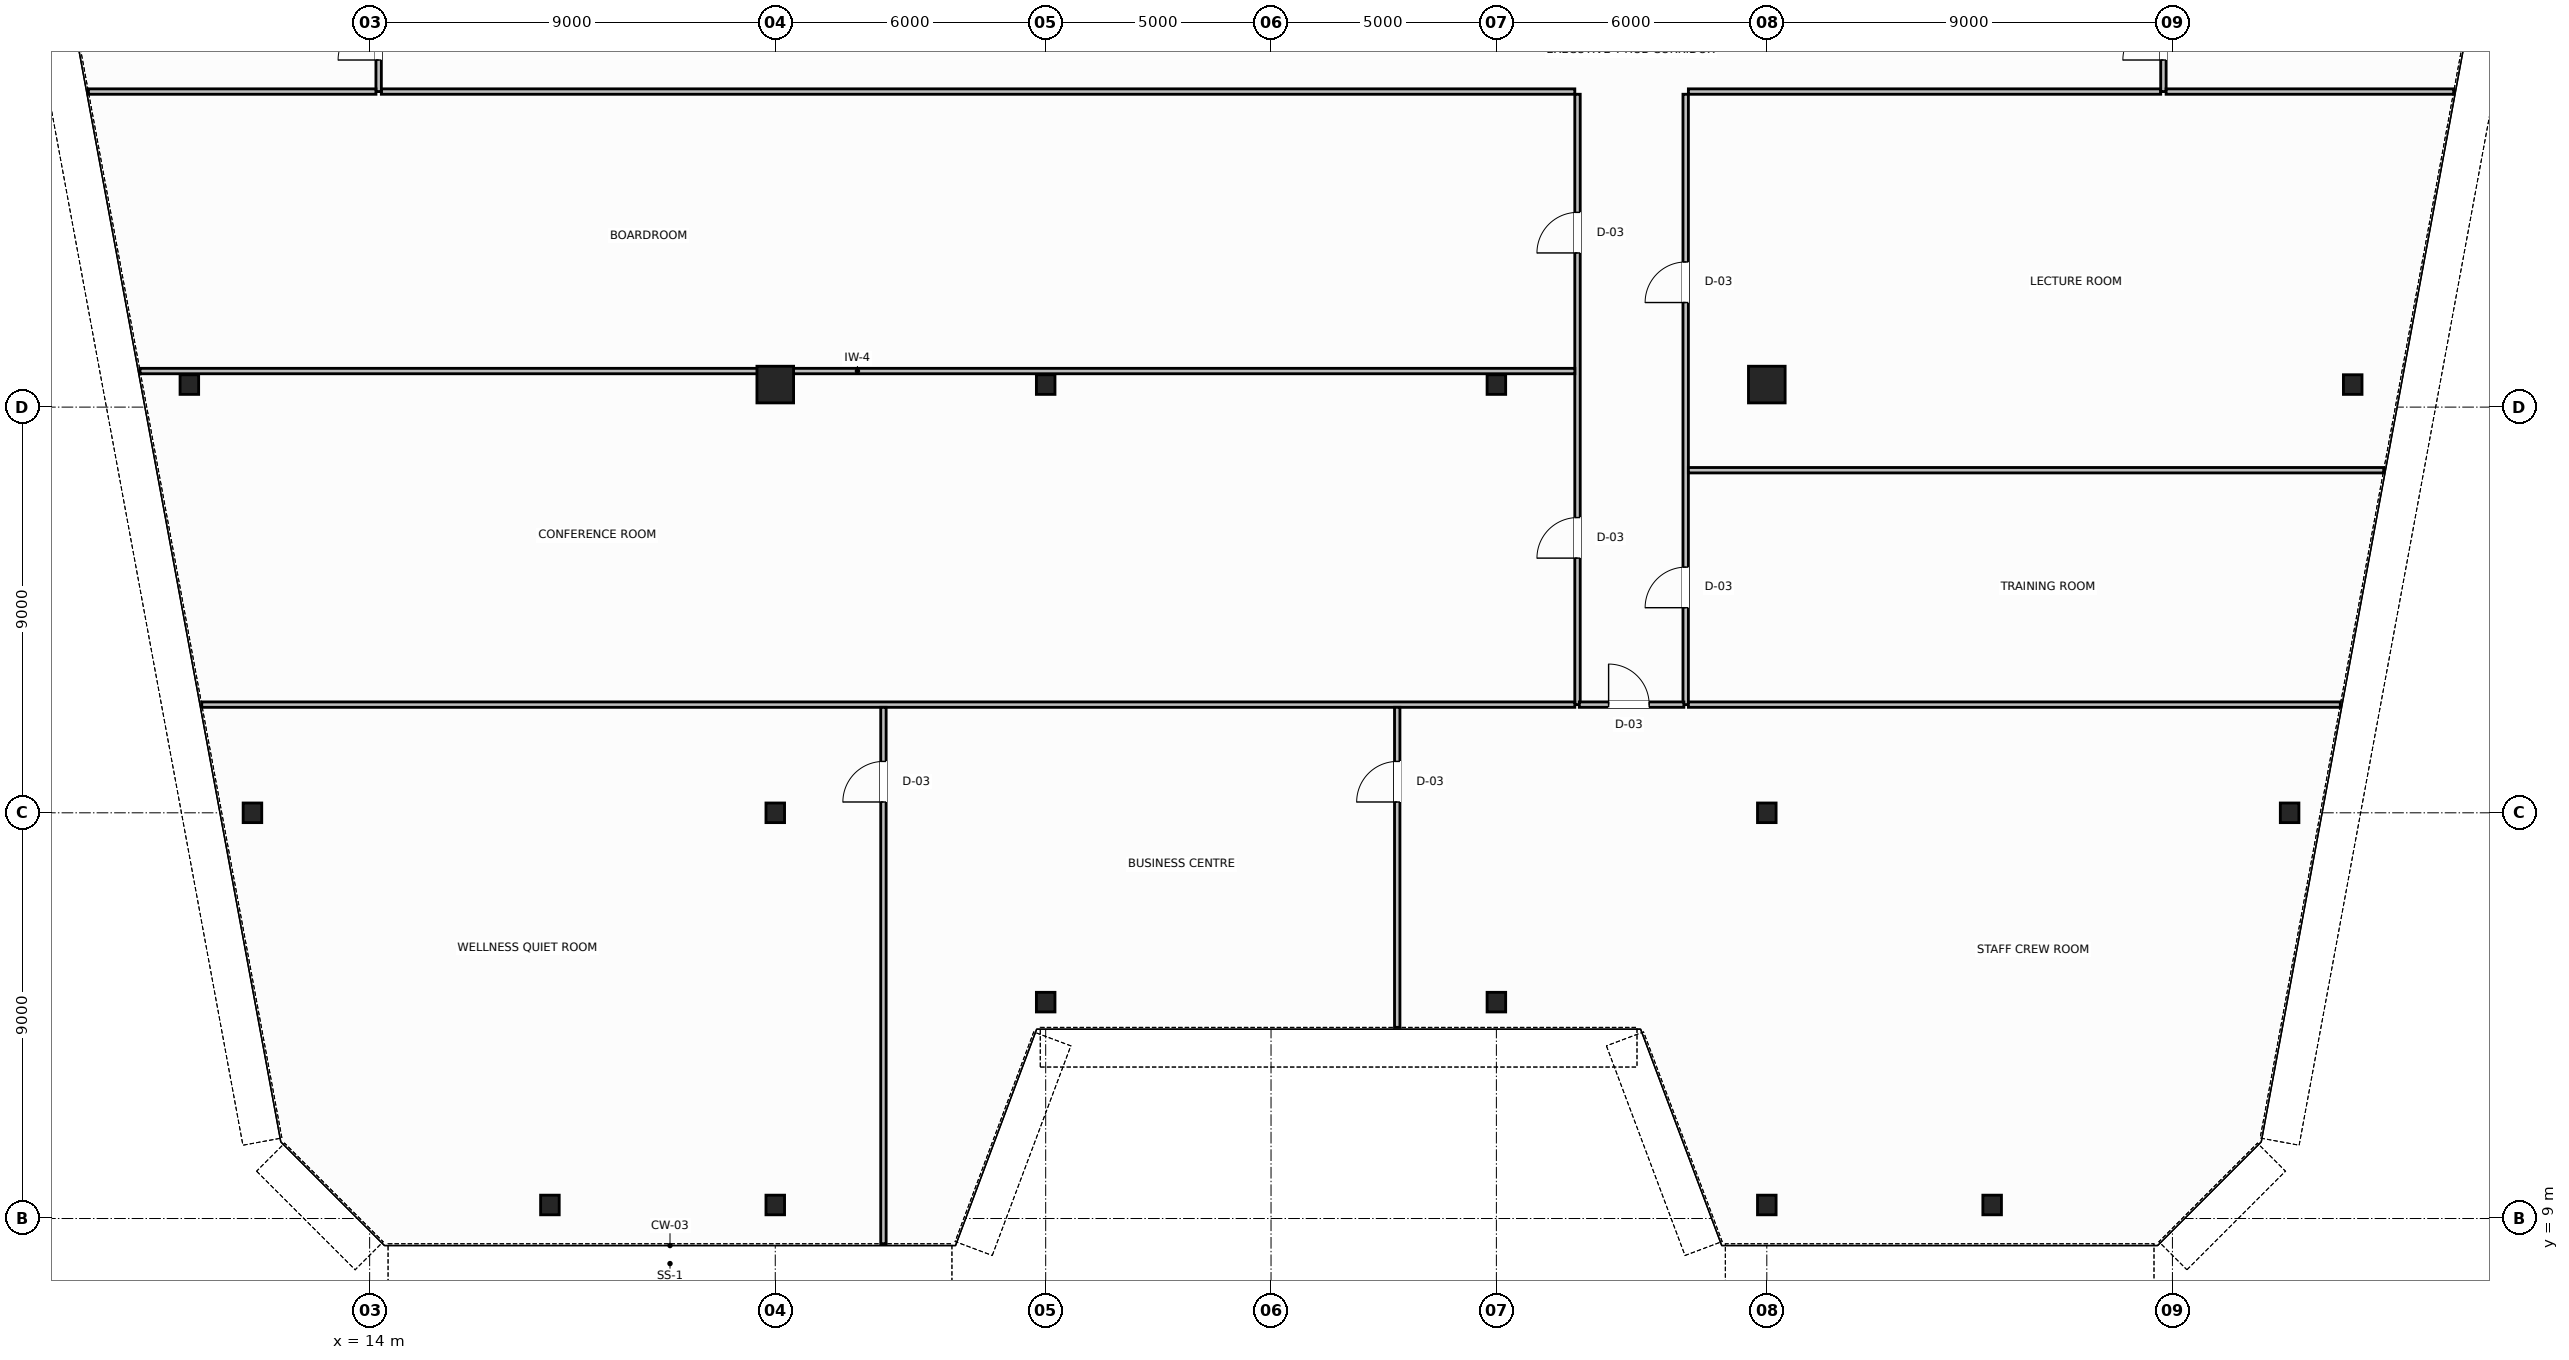
"""IFC4 building model, lengths in metres.
Left out: names, types, materials, properties, quantities, classifications, styles, units other than length and angle.
Written with IfcOpenShell. Run it as: python <this file> out.ifc"""

import sys

from ifc_helpers import new_model, si_unit, direction, frame, frame_2d, origin, origin_2d, place, context, subcontext, project, spatial, rectangle, hollow_circle, i_section, extrude, source, transform, mapped, element, fill, save


model = new_model("IFC4")
c1 = context("Model", 3, precision=1e-05, world=origin(), true_north=direction((0.0, 1.0)))
c2 = subcontext(c1, "Body", "Model", "MODEL_VIEW")
j1 = project(units=[si_unit("LENGTHUNIT", "METRE"), si_unit("PLANEANGLEUNIT", "RADIAN")], contexts=[c1])
p1 = place(None, origin())
s1 = spatial("IfcSite", under=j1, at=p1, CompositionType="ELEMENT")
p2 = place(p1, origin())
s2 = spatial("IfcBuilding", under=s1, at=p2, CompositionType="ELEMENT")
p3 = place(p2, frame((0.0, 0.0, 214.6)))
s3 = spatial("IfcBuildingStorey", under=s2, at=p3, CompositionType="ELEMENT", Elevation=214.6)
m1 = source(origin(), c2, "Body", "SweptSolid", [
    extrude(i_section(OverallWidth=0.412, OverallDepth=0.435, WebThickness=0.036, FlangeThickness=0.05, FilletRadius=0.015, at=origin_2d()), origin(), (0.0, 0.0, 1.0), 3.8),
])
for number, where, z_axis, x_axis in (
    (1, (10.0, 27.5, 0.0), (0.0, 0.0, 1.0), (1.0, 0.0, 0.0)),
    (2, (11.4, 18.0, 0.0), (0.0, 0.0, 1.0), (1.0, 0.0, 0.0)),
    (3, (58.0, 27.5, 0.0), (0.0, 0.0, 1.0), (1.0, 0.0, 0.0)),
    (4, (56.6, 18.0, 0.0), (0.0, 0.0, 1.0), (1.0, 0.0, 0.0)),
):
    element("IfcColumn", number, at=place(p3, frame(where, z_axis=z_axis, x_axis=x_axis)), inside=s3, PredefinedType="COLUMN", context=c2, shape_type="MappedRepresentation", body=[
        mapped(m1, transform((0.0, 0.0, 0.0), scale=1.0)),
    ])
m2 = source(origin(), c2, "Body", "SweptSolid", [
    extrude(hollow_circle(Radius=0.406, WallThickness=0.04, at=origin_2d()), origin(), (0.0, 0.0, 1.0), 3.8),
])
p4 = place(p3, frame((23.0, 27.5, 0.0), z_axis=(0.0, 0.0, 1.0), x_axis=(1.0, 0.0, 0.0)))
e5 = element("IfcColumn", 5, at=p4, inside=s3, PredefinedType="COLUMN", context=c2, shape_type="MappedRepresentation", body=[
    mapped(m2, transform((0.0, 0.0, 0.0), scale=1.0)),
])
m3 = source(origin(), c2, "Body", "SweptSolid", [
    extrude(i_section(OverallWidth=0.412, OverallDepth=0.435, WebThickness=0.036, FlangeThickness=0.05, FilletRadius=0.015, at=origin_2d()), origin(), (0.0, 0.0, 1.0), 3.8),
])
for number, where, z_axis, x_axis in (
    (6, (29.0, 27.5, 0.0), (0.0, 0.0, 1.0), (1.0, 0.0, 0.0)),
    (7, (39.0, 27.5, 0.0), (0.0, 0.0, 1.0), (1.0, 0.0, 0.0)),
):
    element("IfcColumn", number, at=place(p3, frame(where, z_axis=z_axis, x_axis=x_axis)), inside=s3, PredefinedType="COLUMN", context=c2, shape_type="MappedRepresentation", body=[
        mapped(m3, transform((0.0, 0.0, 0.0), scale=1.0)),
    ])
p5 = place(p3, frame((45.0, 27.5, 0.0), z_axis=(0.0, 0.0, 1.0), x_axis=(1.0, 0.0, 0.0)))
e8 = element("IfcColumn", 8, at=p5, inside=s3, PredefinedType="COLUMN", context=c2, shape_type="MappedRepresentation", body=[
    mapped(m2, transform((0.0, 0.0, 0.0), scale=1.0)),
])
for number, where, z_axis, x_axis in (
    (9, (23.0, 18.0, 0.0), (0.0, 0.0, 1.0), (1.0, 0.0, 0.0)),
    (10, (45.0, 18.0, 0.0), (0.0, 0.0, 1.0), (1.0, 0.0, 0.0)),
    (11, (18.0, 9.3, 0.0), (0.0, 0.0, 1.0), (1.0, 0.0, 0.0)),
    (12, (23.0, 9.3, 0.0), (0.0, 0.0, 1.0), (1.0, 0.0, 0.0)),
    (13, (29.0, 13.8, 0.0), (0.0, 0.0, 1.0), (1.0, 0.0, 0.0)),
    (14, (39.0, 13.8, 0.0), (0.0, 0.0, 1.0), (1.0, 0.0, 0.0)),
    (15, (45.0, 9.3, 0.0), (0.0, 0.0, 1.0), (1.0, 0.0, 0.0)),
    (16, (50.0, 9.3, 0.0), (0.0, 0.0, 1.0), (1.0, 0.0, 0.0)),
):
    element("IfcColumn", number, at=place(p3, frame(where, z_axis=z_axis, x_axis=x_axis)), inside=s3, PredefinedType="COLUMN", context=c2, shape_type="MappedRepresentation", body=[
        mapped(m3, transform((0.0, 0.0, 0.0), scale=1.0)),
    ])
p6 = place(p3, frame((14.26, 34.0, 0.0), z_axis=(0.0, 0.0, 1.0), x_axis=(1.0, 0.0, 0.0)))
e17 = element("IfcWall", 17, at=p6, inside=s3, PredefinedType="PARTITIONING", context=c2, shape_type="SweptSolid", body=[
    extrude(rectangle(XDim=26.48, YDim=0.12, at=frame_2d((13.24, 0.0))), origin(), (0.0, 0.0, 1.0), 3.54),
])
p7 = place(p3, frame((43.26, 34.0, 0.0), z_axis=(0.0, 0.0, 1.0), x_axis=(1.0, 0.0, 0.0)))
e18 = element("IfcWall", 18, at=p7, inside=s3, PredefinedType="PARTITIONING", context=c2, shape_type="SweptSolid", body=[
    extrude(rectangle(XDim=10.48, YDim=0.12, at=frame_2d((5.24, 0.0))), origin(), (0.0, 0.0, 1.0), 3.54),
])
p8 = place(p3, frame((14.2, 34.0, 0.0), z_axis=(0.0, 0.0, 1.0), x_axis=(0.0, 1.0, 0.0)))
e19 = element("IfcWall", 19, at=p8, inside=s3, PredefinedType="PARTITIONING", context=c2, shape_type="SweptSolid", body=[
    extrude(rectangle(XDim=2.44, YDim=0.12, at=frame_2d((1.22, 0.0))), origin(), (0.0, 0.0, 1.0), 3.54),
])
p9 = place(p8, frame((0.7, 0.0, 0.0)))
e20 = element("IfcOpeningElement", 20, at=p9, cuts=e19, PredefinedType="OPENING", context=c2, shape_type="SweptSolid", body=[
    extrude(rectangle(XDim=0.9, YDim=2.15, at=frame_2d((0.45, 1.075))), frame((0.0, 0.07, 0.0), z_axis=(0.0, -1.0, 0.0), x_axis=(1.0, 0.0, 0.0)), (0.0, 0.0, 1.0), 0.14),
])
p10 = place(p3, frame((53.8, 34.0, 0.0), z_axis=(0.0, 0.0, 1.0), x_axis=(0.0, 1.0, 0.0)))
e21 = element("IfcWall", 21, at=p10, inside=s3, PredefinedType="PARTITIONING", context=c2, shape_type="SweptSolid", body=[
    extrude(rectangle(XDim=2.44, YDim=0.12, at=frame_2d((1.22, 0.0))), origin(), (0.0, 0.0, 1.0), 3.54),
])
p11 = place(p10, frame((0.7, 0.0, 0.0)))
e22 = element("IfcOpeningElement", 22, at=p11, cuts=e21, PredefinedType="OPENING", context=c2, shape_type="SweptSolid", body=[
    extrude(rectangle(XDim=0.9, YDim=2.15, at=frame_2d((0.45, 1.075))), frame((0.0, 0.07, 0.0), z_axis=(0.0, -1.0, 0.0), x_axis=(1.0, 0.0, 0.0)), (0.0, 0.0, 1.0), 0.14),
])
p12 = place(p3, frame((40.8, 20.4, 0.0), z_axis=(0.0, 0.0, 1.0), x_axis=(0.0, 1.0, 0.0)))
e23 = element("IfcWall", 23, at=p12, inside=s3, PredefinedType="PARTITIONING", context=c2, shape_type="SweptSolid", body=[
    extrude(rectangle(XDim=13.54, YDim=0.12, at=frame_2d((6.77, 0.0))), origin(), (0.0, 0.0, 1.0), 3.54),
])
p13 = place(p12, frame((3.25, 0.0, 0.0)))
e24 = element("IfcOpeningElement", 24, at=p13, cuts=e23, PredefinedType="OPENING", context=c2, shape_type="SweptSolid", body=[
    extrude(rectangle(XDim=0.9, YDim=2.15, at=frame_2d((0.45, 1.075))), frame((0.0, 0.07, 0.0), z_axis=(0.0, -1.0, 0.0), x_axis=(1.0, 0.0, 0.0)), (0.0, 0.0, 1.0), 0.14),
])
p14 = place(p12, frame((10.02, 0.0, 0.0)))
e25 = element("IfcOpeningElement", 25, at=p14, cuts=e23, PredefinedType="OPENING", context=c2, shape_type="SweptSolid", body=[
    extrude(rectangle(XDim=0.9, YDim=2.15, at=frame_2d((0.45, 1.075))), frame((0.0, 0.07, 0.0), z_axis=(0.0, -1.0, 0.0), x_axis=(1.0, 0.0, 0.0)), (0.0, 0.0, 1.0), 0.14),
])
p15 = place(p3, frame((43.2, 20.4, 0.0), z_axis=(0.0, 0.0, 1.0), x_axis=(0.0, 1.0, 0.0)))
e26 = element("IfcWall", 26, at=p15, inside=s3, PredefinedType="PARTITIONING", context=c2, shape_type="SweptSolid", body=[
    extrude(rectangle(XDim=13.54, YDim=0.12, at=frame_2d((6.77, 0.0))), origin(), (0.0, 0.0, 1.0), 3.54),
])
p16 = place(p15, frame((2.15, 0.0, 0.0)))
e27 = element("IfcOpeningElement", 27, at=p16, cuts=e26, PredefinedType="OPENING", context=c2, shape_type="SweptSolid", body=[
    extrude(rectangle(XDim=0.9, YDim=2.15, at=frame_2d((0.45, 1.075))), frame((0.0, 0.07, 0.0), z_axis=(0.0, -1.0, 0.0), x_axis=(1.0, 0.0, 0.0)), (0.0, 0.0, 1.0), 0.14),
])
p17 = place(p15, frame((8.92, 0.0, 0.0)))
e28 = element("IfcOpeningElement", 28, at=p17, cuts=e26, PredefinedType="OPENING", context=c2, shape_type="SweptSolid", body=[
    extrude(rectangle(XDim=0.9, YDim=2.15, at=frame_2d((0.45, 1.075))), frame((0.0, 0.07, 0.0), z_axis=(0.0, -1.0, 0.0), x_axis=(1.0, 0.0, 0.0)), (0.0, 0.0, 1.0), 0.14),
])
p18 = place(p3, frame((40.84, 20.4, 0.0), z_axis=(0.0, 0.0, 1.0), x_axis=(1.0, 0.0, 0.0)))
e29 = element("IfcWall", 29, at=p18, inside=s3, PredefinedType="PARTITIONING", context=c2, shape_type="SweptSolid", body=[
    extrude(rectangle(XDim=2.32, YDim=0.12, at=frame_2d((1.16, 0.0))), origin(), (0.0, 0.0, 1.0), 3.54),
])
p19 = place(p18, frame((0.65, 0.0, 0.0)))
e30 = element("IfcOpeningElement", 30, at=p19, cuts=e29, PredefinedType="OPENING", context=c2, shape_type="SweptSolid", body=[
    extrude(rectangle(XDim=0.9, YDim=2.15, at=frame_2d((0.45, 1.075))), frame((0.0, 0.07, 0.0), z_axis=(0.0, -1.0, 0.0), x_axis=(1.0, 0.0, 0.0)), (0.0, 0.0, 1.0), 0.14),
])
for number, where, z_axis, x_axis in (
    (31, (7.759, 34.0, 0.0), (0.0, 0.0, 1.0), (1.0, 0.0, 0.0)),
    (32, (53.86, 34.0, 0.0), (0.0, 0.0, 1.0), (1.0, 0.0, 0.0)),
):
    element("IfcWall", number, at=place(p3, frame(where, z_axis=z_axis, x_axis=x_axis)), inside=s3, PredefinedType="PARTITIONING", context=c2, shape_type="SweptSolid", body=[
        extrude(rectangle(XDim=6.381, YDim=0.12, at=frame_2d((3.19, 0.0))), origin(), (0.0, 0.0, 1.0), 3.54),
    ])
p20 = place(p3, frame((8.906, 27.8, 0.0), z_axis=(0.0, 0.0, 1.0), x_axis=(1.0, 0.0, 0.0)))
e33 = element("IfcWall", 33, at=p20, inside=s3, PredefinedType="PARTITIONING", context=c2, shape_type="SweptSolid", body=[
    extrude(rectangle(XDim=31.834, YDim=0.12, at=frame_2d((15.917, 0.0))), origin(), (0.0, 0.0, 1.0), 3.54),
])
p21 = place(p3, frame((43.26, 25.6, 0.0), z_axis=(0.0, 0.0, 1.0), x_axis=(1.0, 0.0, 0.0)))
e34 = element("IfcWall", 34, at=p21, inside=s3, PredefinedType="PARTITIONING", context=c2, shape_type="SweptSolid", body=[
    extrude(rectangle(XDim=15.427, YDim=0.12, at=frame_2d((7.713, 0.0))), origin(), (0.0, 0.0, 1.0), 3.54),
])
p22 = place(p3, frame((10.275, 20.4, 0.0), z_axis=(0.0, 0.0, 1.0), x_axis=(1.0, 0.0, 0.0)))
e35 = element("IfcWall", 35, at=p22, inside=s3, PredefinedType="PARTITIONING", context=c2, shape_type="SweptSolid", body=[
    extrude(rectangle(XDim=30.465, YDim=0.12, at=frame_2d((15.232, 0.0))), origin(), (0.0, 0.0, 1.0), 3.54),
])
p23 = place(p3, frame((43.26, 20.4, 0.0), z_axis=(0.0, 0.0, 1.0), x_axis=(1.0, 0.0, 0.0)))
e36 = element("IfcWall", 36, at=p23, inside=s3, PredefinedType="PARTITIONING", context=c2, shape_type="SweptSolid", body=[
    extrude(rectangle(XDim=14.465, YDim=0.12, at=frame_2d((7.232, 0.0))), origin(), (0.0, 0.0, 1.0), 3.54),
])
p24 = place(p3, frame((25.4, 8.44, 0.0), z_axis=(0.0, 0.0, 1.0), x_axis=(0.0, 1.0, 0.0)))
e37 = element("IfcWall", 37, at=p24, inside=s3, PredefinedType="PARTITIONING", context=c2, shape_type="SweptSolid", body=[
    extrude(rectangle(XDim=11.9, YDim=0.12, at=frame_2d((5.95, 0.0))), origin(), (0.0, 0.0, 1.0), 3.54),
])
p25 = place(p24, frame((9.8, 0.0, 0.0)))
e38 = element("IfcOpeningElement", 38, at=p25, cuts=e37, PredefinedType="OPENING", context=c2, shape_type="SweptSolid", body=[
    extrude(rectangle(XDim=0.9, YDim=2.15, at=frame_2d((0.45, 1.075))), frame((0.0, 0.07, 0.0), z_axis=(0.0, -1.0, 0.0), x_axis=(1.0, 0.0, 0.0)), (0.0, 0.0, 1.0), 0.14),
])
p26 = place(p3, frame((36.8, 13.24, 0.0), z_axis=(0.0, 0.0, 1.0), x_axis=(0.0, 1.0, 0.0)))
e39 = element("IfcWall", 39, at=p26, inside=s3, PredefinedType="PARTITIONING", context=c2, shape_type="SweptSolid", body=[
    extrude(rectangle(XDim=7.1, YDim=0.12, at=frame_2d((3.55, 0.0))), origin(), (0.0, 0.0, 1.0), 3.54),
])
p27 = place(p26, frame((5.0, 0.0, 0.0)))
e40 = element("IfcOpeningElement", 40, at=p27, cuts=e39, PredefinedType="OPENING", context=c2, shape_type="SweptSolid", body=[
    extrude(rectangle(XDim=0.9, YDim=2.15, at=frame_2d((0.45, 1.075))), frame((0.0, 0.07, 0.0), z_axis=(0.0, -1.0, 0.0), x_axis=(1.0, 0.0, 0.0)), (0.0, 0.0, 1.0), 0.14),
])
m4 = source(origin(), c2, "Body", "SweptSolid", [
    extrude(rectangle(XDim=0.9, YDim=2.15, at=frame_2d((0.45, 1.075))), frame((0.0, 0.025, 0.0), z_axis=(0.0, -1.0, 0.0), x_axis=(1.0, 0.0, 0.0)), (0.0, 0.0, 1.0), 0.05),
])
p28 = place(p9, origin())
e41 = element("IfcDoor", 41, at=p28, inside=s3, OperationType="SINGLE_SWING_LEFT", PredefinedType="DOOR", context=c2, shape_type="MappedRepresentation", body=[
    mapped(m4, transform((0.0, 0.0, 0.0), scale=1.0)),
])
fill(e20, e41)
p29 = place(p11, origin())
e42 = element("IfcDoor", 42, at=p29, inside=s3, OperationType="SINGLE_SWING_RIGHT", PredefinedType="DOOR", context=c2, shape_type="MappedRepresentation", body=[
    mapped(m4, transform((0.0, 0.0, 0.0), scale=1.0)),
])
fill(e22, e42)
p30 = place(p13, origin())
e43 = element("IfcDoor", 43, at=p30, inside=s3, OperationType="SINGLE_SWING_LEFT", PredefinedType="DOOR", context=c2, shape_type="MappedRepresentation", body=[
    mapped(m4, transform((0.0, 0.0, 0.0), scale=1.0)),
])
fill(e24, e43)
p31 = place(p14, origin())
e44 = element("IfcDoor", 44, at=p31, inside=s3, OperationType="SINGLE_SWING_RIGHT", PredefinedType="DOOR", context=c2, shape_type="MappedRepresentation", body=[
    mapped(m4, transform((0.0, 0.0, 0.0), scale=1.0)),
])
fill(e25, e44)
p32 = place(p16, origin())
e45 = element("IfcDoor", 45, at=p32, inside=s3, OperationType="SINGLE_SWING_RIGHT", PredefinedType="DOOR", context=c2, shape_type="MappedRepresentation", body=[
    mapped(m4, transform((0.0, 0.0, 0.0), scale=1.0)),
])
fill(e27, e45)
p33 = place(p17, origin())
e46 = element("IfcDoor", 46, at=p33, inside=s3, OperationType="SINGLE_SWING_LEFT", PredefinedType="DOOR", context=c2, shape_type="MappedRepresentation", body=[
    mapped(m4, transform((0.0, 0.0, 0.0), scale=1.0)),
])
fill(e28, e46)
p34 = place(p25, origin())
e47 = element("IfcDoor", 47, at=p34, inside=s3, OperationType="SINGLE_SWING_RIGHT", PredefinedType="DOOR", context=c2, shape_type="MappedRepresentation", body=[
    mapped(m4, transform((0.0, 0.0, 0.0), scale=1.0)),
])
fill(e38, e47)
p35 = place(p27, origin())
e48 = element("IfcDoor", 48, at=p35, inside=s3, OperationType="SINGLE_SWING_LEFT", PredefinedType="DOOR", context=c2, shape_type="MappedRepresentation", body=[
    mapped(m4, transform((0.0, 0.0, 0.0), scale=1.0)),
])
fill(e40, e48)
p36 = place(p19, origin())
e49 = element("IfcDoor", 49, at=p36, inside=s3, OperationType="SINGLE_SWING_LEFT", PredefinedType="DOOR", context=c2, shape_type="MappedRepresentation", body=[
    mapped(m4, transform((0.0, 0.0, 0.0), scale=1.0)),
])
fill(e30, e49)
save(model, sys.argv[1])
